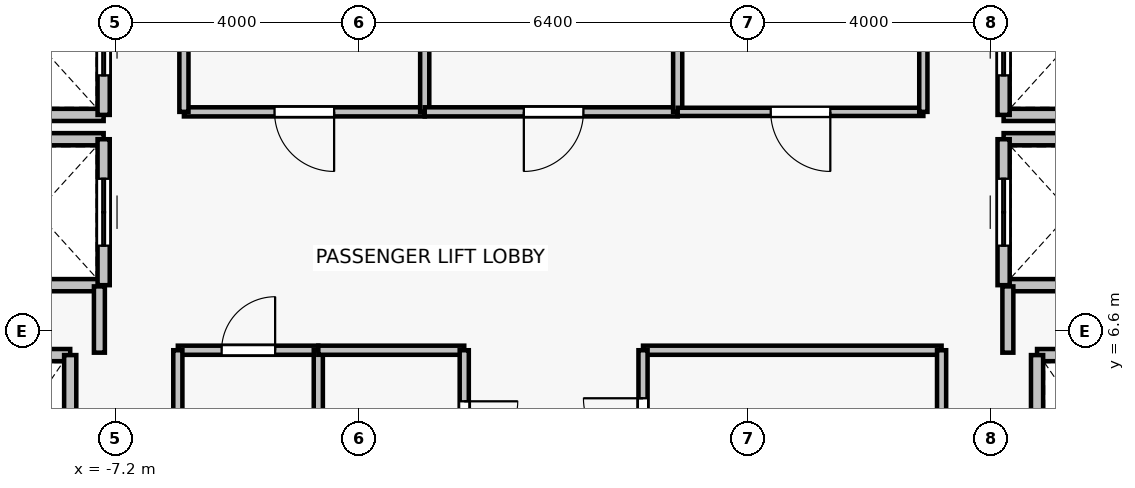
"""IFC4 building model, lengths in metres.
Left out: names, types, materials, properties, quantities, classifications, styles, units other than length and angle.
Written with IfcOpenShell. Run it as: python <this file> out.ifc"""

import sys

from ifc_helpers import new_model, si_unit, direction, frame, frame_2d, origin, place, context, subcontext, project, spatial, rectangle, extrude, source, transform, mapped, element, fill, save


model = new_model("IFC4")
c1 = context("Model", 3, precision=1e-05, world=origin(), true_north=direction((0.0, 1.0)))
c2 = subcontext(c1, "Body", "Model", "MODEL_VIEW")
j1 = project(units=[si_unit("LENGTHUNIT", "METRE"), si_unit("PLANEANGLEUNIT", "RADIAN")], contexts=[c1])
p1 = place(None, origin())
s1 = spatial("IfcSite", under=j1, at=p1, CompositionType="ELEMENT")
p2 = place(p1, origin())
s2 = spatial("IfcBuilding", under=s1, at=p2, CompositionType="ELEMENT")
p3 = place(p2, frame((0.0, 0.0, 245.2)))
s3 = spatial("IfcBuildingStorey", under=s2, at=p3, CompositionType="ELEMENT", Elevation=245.2)
p4 = place(p3, frame((-9.95, 6.2, 0.0), z_axis=(0.0, 0.0, 1.0), x_axis=(1.0, 0.0, 0.0)))
e1 = element("IfcWall", 1, at=p4, inside=s3, PredefinedType="SOLIDWALL", context=c2, shape_type="SweptSolid", body=[
    extrude(rectangle(XDim=2.0, YDim=0.2, at=frame_2d((1.0, 0.0))), origin(), (0.0, 0.0, 1.0), 3.075),
])
p5 = place(p3, frame((-7.95, 6.2, 0.0), z_axis=(0.0, 0.0, 1.0), x_axis=(0.0, -1.0, 0.0)))
e2 = element("IfcWall", 2, at=p5, inside=s3, PredefinedType="SOLIDWALL", context=c2, shape_type="SweptSolid", body=[
    extrude(rectangle(XDim=2.8, YDim=0.2, at=frame_2d((1.4, 0.0))), origin(), (0.0, 0.0, 1.0), 3.075),
])
p6 = place(p3, frame((7.95, 6.2, 0.0), z_axis=(0.0, 0.0, 1.0), x_axis=(1.0, 0.0, 0.0)))
e3 = element("IfcWall", 3, at=p6, inside=s3, PredefinedType="SOLIDWALL", context=c2, shape_type="SweptSolid", body=[
    extrude(rectangle(XDim=2.0, YDim=0.2, at=frame_2d((1.0, 0.0))), origin(), (0.0, 0.0, 1.0), 3.075),
])
p7 = place(p3, frame((7.95, 3.4, 0.0), z_axis=(0.0, 0.0, 1.0), x_axis=(0.0, 1.0, 0.0)))
e4 = element("IfcWall", 4, at=p7, inside=s3, PredefinedType="SOLIDWALL", context=c2, shape_type="SweptSolid", body=[
    extrude(rectangle(XDim=2.8, YDim=0.2, at=frame_2d((1.4, 0.0))), origin(), (0.0, 0.0, 1.0), 3.075),
])
for number, where, z_axis, x_axis in (
    (5, (-7.4, 7.35, 0.0), (0.0, 0.0, 1.0), (-1.0, 0.0, 0.0)),
    (6, (-9.6, 9.75, 0.0), (0.0, 0.0, 1.0), (1.0, 0.0, 0.0)),
):
    element("IfcWall", number, at=place(p3, frame(where, z_axis=z_axis, x_axis=x_axis)), inside=s3, PredefinedType="SOLIDWALL", context=c2, shape_type="SweptSolid", body=[
        extrude(rectangle(XDim=2.2, YDim=0.2, at=frame_2d((1.1, 0.0))), origin(), (0.0, 0.0, 1.0), 2.615),
    ])
p8 = place(p3, frame((-7.4, 9.75, 0.0), z_axis=(0.0, 0.0, 1.0), x_axis=(0.0, -1.0, 0.0)))
e7 = element("IfcWall", 7, at=p8, inside=s3, PredefinedType="SOLIDWALL", context=c2, shape_type="SweptSolid", body=[
    extrude(rectangle(XDim=2.4, YDim=0.2, at=frame_2d((1.2, 0.0))), origin(), (0.0, 0.0, 1.0), 2.615),
])
p9 = place(p8, frame((0.65, 0.0, 0.0)))
e8 = element("IfcOpeningElement", 8, at=p9, cuts=e7, PredefinedType="OPENING", context=c2, shape_type="SweptSolid", body=[
    extrude(rectangle(XDim=1.1, YDim=2.2, at=frame_2d((0.55, 1.1))), frame((0.0, 0.11, 0.0), z_axis=(0.0, -1.0, 0.0), x_axis=(1.0, 0.0, 0.0)), (0.0, 0.0, 1.0), 0.22),
])
p10 = place(p3, frame((-7.4, 10.15, 0.0), z_axis=(0.0, 0.0, 1.0), x_axis=(-1.0, 0.0, 0.0)))
e9 = element("IfcWall", 9, at=p10, inside=s3, PredefinedType="SOLIDWALL", context=c2, shape_type="SweptSolid", body=[
    extrude(rectangle(XDim=2.2, YDim=0.2, at=frame_2d((1.1, 0.0))), origin(), (0.0, 0.0, 1.0), 2.615),
])
p11 = place(p3, frame((-7.4, 12.55, 0.0), z_axis=(0.0, 0.0, 1.0), x_axis=(0.0, -1.0, 0.0)))
e10 = element("IfcWall", 10, at=p11, inside=s3, PredefinedType="SOLIDWALL", context=c2, shape_type="SweptSolid", body=[
    extrude(rectangle(XDim=2.4, YDim=0.2, at=frame_2d((1.2, 0.0))), origin(), (0.0, 0.0, 1.0), 2.615),
])
p12 = place(p11, frame((0.65, 0.0, 0.0)))
e11 = element("IfcOpeningElement", 11, at=p12, cuts=e10, PredefinedType="OPENING", context=c2, shape_type="SweptSolid", body=[
    extrude(rectangle(XDim=1.1, YDim=2.2, at=frame_2d((0.55, 1.1))), frame((0.0, 0.11, 0.0), z_axis=(0.0, -1.0, 0.0), x_axis=(1.0, 0.0, 0.0)), (0.0, 0.0, 1.0), 0.22),
])
for number, where, z_axis, x_axis in (
    (12, (9.6, 7.35, 0.0), (0.0, 0.0, 1.0), (-1.0, 0.0, 0.0)),
    (13, (7.4, 9.75, 0.0), (0.0, 0.0, 1.0), (1.0, 0.0, 0.0)),
):
    element("IfcWall", number, at=place(p3, frame(where, z_axis=z_axis, x_axis=x_axis)), inside=s3, PredefinedType="SOLIDWALL", context=c2, shape_type="SweptSolid", body=[
        extrude(rectangle(XDim=2.2, YDim=0.2, at=frame_2d((1.1, 0.0))), origin(), (0.0, 0.0, 1.0), 2.615),
    ])
p13 = place(p3, frame((7.4, 7.35, 0.0), z_axis=(0.0, 0.0, 1.0), x_axis=(0.0, 1.0, 0.0)))
e14 = element("IfcWall", 14, at=p13, inside=s3, PredefinedType="SOLIDWALL", context=c2, shape_type="SweptSolid", body=[
    extrude(rectangle(XDim=2.4, YDim=0.2, at=frame_2d((1.2, 0.0))), origin(), (0.0, 0.0, 1.0), 2.615),
])
p14 = place(p13, frame((0.65, 0.0, 0.0)))
e15 = element("IfcOpeningElement", 15, at=p14, cuts=e14, PredefinedType="OPENING", context=c2, shape_type="SweptSolid", body=[
    extrude(rectangle(XDim=1.1, YDim=2.2, at=frame_2d((0.55, 1.1))), frame((0.0, 0.11, 0.0), z_axis=(0.0, -1.0, 0.0), x_axis=(1.0, 0.0, 0.0)), (0.0, 0.0, 1.0), 0.22),
])
p15 = place(p3, frame((9.6, 10.15, 0.0), z_axis=(0.0, 0.0, 1.0), x_axis=(-1.0, 0.0, 0.0)))
e16 = element("IfcWall", 16, at=p15, inside=s3, PredefinedType="SOLIDWALL", context=c2, shape_type="SweptSolid", body=[
    extrude(rectangle(XDim=2.2, YDim=0.2, at=frame_2d((1.1, 0.0))), origin(), (0.0, 0.0, 1.0), 2.615),
])
p16 = place(p3, frame((7.4, 10.15, 0.0), z_axis=(0.0, 0.0, 1.0), x_axis=(0.0, 1.0, 0.0)))
e17 = element("IfcWall", 17, at=p16, inside=s3, PredefinedType="SOLIDWALL", context=c2, shape_type="SweptSolid", body=[
    extrude(rectangle(XDim=2.4, YDim=0.2, at=frame_2d((1.2, 0.0))), origin(), (0.0, 0.0, 1.0), 2.615),
])
p17 = place(p16, frame((0.65, 0.0, 0.0)))
e18 = element("IfcOpeningElement", 18, at=p17, cuts=e17, PredefinedType="OPENING", context=c2, shape_type="SweptSolid", body=[
    extrude(rectangle(XDim=1.1, YDim=2.2, at=frame_2d((0.55, 1.1))), frame((0.0, 0.11, 0.0), z_axis=(0.0, -1.0, 0.0), x_axis=(1.0, 0.0, 0.0)), (0.0, 0.0, 1.0), 0.22),
])
for number, where, z_axis, x_axis in (
    (19, (-7.47, 7.33, 0.0), (0.0, 0.0, 1.0), (0.0, -1.0, 0.0)),
    (20, (7.47, 6.24, 0.0), (0.0, 0.0, 1.0), (0.0, 1.0, 0.0)),
):
    element("IfcWall", number, at=place(p3, frame(where, z_axis=z_axis, x_axis=x_axis)), inside=s3, PredefinedType="PARTITIONING", context=c2, shape_type="SweptSolid", body=[
        extrude(rectangle(XDim=1.09, YDim=0.18, at=frame_2d((0.545, 0.0))), origin(), (0.0, 0.0, 1.0), 2.615),
    ])
p18 = place(p3, frame((-2.12, 10.2, 0.0), z_axis=(0.0, 0.0, 1.0), x_axis=(-1.0, 0.0, 0.0)))
e21 = element("IfcWall", 21, at=p18, inside=s3, PredefinedType="PARTITIONING", context=c2, shape_type="SweptSolid", body=[
    extrude(rectangle(XDim=3.96, YDim=0.15, at=frame_2d((1.98, 0.0))), origin(), (0.0, 0.0, 1.0), 3.075),
])
p19 = place(p18, frame((1.49, 0.0, 0.0)))
e22 = element("IfcOpeningElement", 22, at=p19, cuts=e21, PredefinedType="OPENING", context=c2, shape_type="SweptSolid", body=[
    extrude(rectangle(XDim=0.98, YDim=2.15, at=frame_2d((0.49, 1.075))), frame((0.0, 0.085, 0.0), z_axis=(0.0, -1.0, 0.0), x_axis=(1.0, 0.0, 0.0)), (0.0, 0.0, 1.0), 0.17),
])
for number, where, z_axis, x_axis in (
    (23, (-6.08, 10.2, 0.0), (0.0, 0.0, 1.0), (0.0, 1.0, 0.0)),
    (24, (-2.12, 13.0, 0.0), (0.0, 0.0, 1.0), (0.0, -1.0, 0.0)),
):
    element("IfcWall", number, at=place(p3, frame(where, z_axis=z_axis, x_axis=x_axis)), inside=s3, PredefinedType="PARTITIONING", context=c2, shape_type="SweptSolid", body=[
        extrude(rectangle(XDim=2.8, YDim=0.15, at=frame_2d((1.4, 0.0))), origin(), (0.0, 0.0, 1.0), 3.075),
    ])
p20 = place(p3, frame((2.04, 10.2, 0.0), z_axis=(0.0, 0.0, 1.0), x_axis=(-1.0, 0.0, 0.0)))
e25 = element("IfcWall", 25, at=p20, inside=s3, PredefinedType="PARTITIONING", context=c2, shape_type="SweptSolid", body=[
    extrude(rectangle(XDim=4.16, YDim=0.15, at=frame_2d((2.08, 0.0))), origin(), (0.0, 0.0, 1.0), 3.075),
])
p21 = place(p20, frame((1.55, 0.0, 0.0)))
e26 = element("IfcOpeningElement", 26, at=p21, cuts=e25, PredefinedType="OPENING", context=c2, shape_type="SweptSolid", body=[
    extrude(rectangle(XDim=0.98, YDim=2.15, at=frame_2d((0.49, 1.075))), frame((0.0, 0.085, 0.0), z_axis=(0.0, -1.0, 0.0), x_axis=(1.0, 0.0, 0.0)), (0.0, 0.0, 1.0), 0.17),
])
p22 = place(p3, frame((2.04, 13.0, 0.0), z_axis=(0.0, 0.0, 1.0), x_axis=(0.0, -1.0, 0.0)))
e27 = element("IfcWall", 27, at=p22, inside=s3, PredefinedType="PARTITIONING", context=c2, shape_type="SweptSolid", body=[
    extrude(rectangle(XDim=2.8, YDim=0.15, at=frame_2d((1.4, 0.0))), origin(), (0.0, 0.0, 1.0), 3.075),
])
p23 = place(p3, frame((6.08, 10.2, 0.0), z_axis=(0.0, 0.0, 1.0), x_axis=(-1.0, 0.0, 0.0)))
e28 = element("IfcWall", 28, at=p23, inside=s3, PredefinedType="PARTITIONING", context=c2, shape_type="SweptSolid", body=[
    extrude(rectangle(XDim=4.04, YDim=0.135, at=frame_2d((2.02, 0.0))), origin(), (0.0, 0.0, 1.0), 3.075),
])
p24 = place(p23, frame((1.53, 0.0, 0.0)))
e29 = element("IfcOpeningElement", 29, at=p24, cuts=e28, PredefinedType="OPENING", context=c2, shape_type="SweptSolid", body=[
    extrude(rectangle(XDim=0.98, YDim=2.15, at=frame_2d((0.49, 1.075))), frame((0.0, 0.077, 0.0), z_axis=(0.0, -1.0, 0.0), x_axis=(1.0, 0.0, 0.0)), (0.0, 0.0, 1.0), 0.155),
])
p25 = place(p3, frame((6.08, 13.0, 0.0), z_axis=(0.0, 0.0, 1.0), x_axis=(0.0, -1.0, 0.0)))
e30 = element("IfcWall", 30, at=p25, inside=s3, PredefinedType="PARTITIONING", context=c2, shape_type="SweptSolid", body=[
    extrude(rectangle(XDim=2.8, YDim=0.135, at=frame_2d((1.4, 0.0))), origin(), (0.0, 0.0, 1.0), 3.075),
])
p26 = place(p3, frame((-6.18, 6.28, 0.0), z_axis=(0.0, 0.0, 1.0), x_axis=(1.0, 0.0, 0.0)))
e31 = element("IfcWall", 31, at=p26, inside=s3, PredefinedType="PARTITIONING", context=c2, shape_type="SweptSolid", body=[
    extrude(rectangle(XDim=2.31, YDim=0.15, at=frame_2d((1.155, 0.0))), origin(), (0.0, 0.0, 1.0), 3.075),
])
p27 = place(p26, frame((0.72, 0.0, 0.0)))
e32 = element("IfcOpeningElement", 32, at=p27, cuts=e31, PredefinedType="OPENING", context=c2, shape_type="SweptSolid", body=[
    extrude(rectangle(XDim=0.88, YDim=2.1, at=frame_2d((0.44, 1.05))), frame((0.0, 0.085, 0.0), z_axis=(0.0, -1.0, 0.0), x_axis=(1.0, 0.0, 0.0)), (0.0, 0.0, 1.0), 0.17),
])
for number, where, z_axis, x_axis in (
    (33, (-6.18, 3.76, 0.0), (0.0, 0.0, 1.0), (0.0, 1.0, 0.0)),
    (34, (-3.87, 6.28, 0.0), (0.0, 0.0, 1.0), (0.0, -1.0, 0.0)),
):
    element("IfcWall", number, at=place(p3, frame(where, z_axis=z_axis, x_axis=x_axis)), inside=s3, PredefinedType="PARTITIONING", context=c2, shape_type="SweptSolid", body=[
        extrude(rectangle(XDim=2.52, YDim=0.15, at=frame_2d((1.26, 0.0))), origin(), (0.0, 0.0, 1.0), 3.075),
    ])
p28 = place(p3, frame((-3.87, 6.28, 0.0), z_axis=(0.0, 0.0, 1.0), x_axis=(1.0, 0.0, 0.0)))
e35 = element("IfcWall", 35, at=p28, inside=s3, PredefinedType="PARTITIONING", context=c2, shape_type="SweptSolid", body=[
    extrude(rectangle(XDim=2.4, YDim=0.15, at=frame_2d((1.2, 0.0))), origin(), (0.0, 0.0, 1.0), 3.075),
])
p29 = place(p3, frame((-1.47, 6.28, 0.0), z_axis=(0.0, 0.0, 1.0), x_axis=(0.0, -1.0, 0.0)))
e36 = element("IfcWall", 36, at=p29, inside=s3, PredefinedType="PARTITIONING", context=c2, shape_type="SweptSolid", body=[
    extrude(rectangle(XDim=2.52, YDim=0.15, at=frame_2d((1.26, 0.0))), origin(), (0.0, 0.0, 1.0), 3.075),
])
p30 = place(p29, frame((0.84, 0.0, 0.0)))
e37 = element("IfcOpeningElement", 37, at=p30, cuts=e36, PredefinedType="OPENING", context=c2, shape_type="SweptSolid", body=[
    extrude(rectangle(XDim=0.88, YDim=2.1, at=frame_2d((0.44, 1.05))), frame((0.0, 0.085, 0.0), z_axis=(0.0, -1.0, 0.0), x_axis=(1.0, 0.0, 0.0)), (0.0, 0.0, 1.0), 0.17),
])
p31 = place(p3, frame((1.47, 6.28, 0.0), z_axis=(0.0, 0.0, 1.0), x_axis=(1.0, 0.0, 0.0)))
e38 = element("IfcWall", 38, at=p31, inside=s3, PredefinedType="PARTITIONING", context=c2, shape_type="SweptSolid", body=[
    extrude(rectangle(XDim=4.91, YDim=0.15, at=frame_2d((2.455, 0.0))), origin(), (0.0, 0.0, 1.0), 3.075),
])
p32 = place(p3, frame((1.47, 3.76, 0.0), z_axis=(0.0, 0.0, 1.0), x_axis=(0.0, 1.0, 0.0)))
e39 = element("IfcWall", 39, at=p32, inside=s3, PredefinedType="PARTITIONING", context=c2, shape_type="SweptSolid", body=[
    extrude(rectangle(XDim=2.52, YDim=0.15, at=frame_2d((1.26, 0.0))), origin(), (0.0, 0.0, 1.0), 3.075),
])
p33 = place(p32, frame((0.75, 0.0, 0.0)))
e40 = element("IfcOpeningElement", 40, at=p33, cuts=e39, PredefinedType="OPENING", context=c2, shape_type="SweptSolid", body=[
    extrude(rectangle(XDim=0.98, YDim=2.15, at=frame_2d((0.49, 1.075))), frame((0.0, 0.085, 0.0), z_axis=(0.0, -1.0, 0.0), x_axis=(1.0, 0.0, 0.0)), (0.0, 0.0, 1.0), 0.17),
])
p34 = place(p3, frame((6.38, 6.28, 0.0), z_axis=(0.0, 0.0, 1.0), x_axis=(0.0, -1.0, 0.0)))
e41 = element("IfcWall", 41, at=p34, inside=s3, PredefinedType="PARTITIONING", context=c2, shape_type="SweptSolid", body=[
    extrude(rectangle(XDim=2.52, YDim=0.15, at=frame_2d((1.26, 0.0))), origin(), (0.0, 0.0, 1.0), 3.075),
])
m1 = source(origin(), c2, "Body", "SweptSolid", [
    extrude(rectangle(XDim=1.1, YDim=2.2, at=frame_2d((0.55, 1.1))), frame((0.0, 0.025, 0.0), z_axis=(0.0, -1.0, 0.0), x_axis=(1.0, 0.0, 0.0)), (0.0, 0.0, 1.0), 0.05),
])
p35 = place(p9, origin())
e42 = element("IfcDoor", 42, at=p35, inside=s3, OperationType="DOUBLE_DOOR_SLIDING", PredefinedType="DOOR", context=c2, shape_type="MappedRepresentation", body=[
    mapped(m1, transform((0.0, 0.0, 0.0), x_axis=(1.0, 0.0, 0.0), y_axis=(0.0, 1.0, 0.0), z_axis=(0.0, 0.0, 1.0), scale=1.0)),
])
fill(e8, e42)
p36 = place(p12, origin())
e43 = element("IfcDoor", 43, at=p36, inside=s3, OperationType="DOUBLE_DOOR_SLIDING", PredefinedType="DOOR", context=c2, shape_type="MappedRepresentation", body=[
    mapped(m1, transform((0.0, 0.0, 0.0), x_axis=(1.0, 0.0, 0.0), y_axis=(0.0, 1.0, 0.0), z_axis=(0.0, 0.0, 1.0), scale=1.0)),
])
fill(e11, e43)
p37 = place(p14, origin())
e44 = element("IfcDoor", 44, at=p37, inside=s3, OperationType="DOUBLE_DOOR_SLIDING", PredefinedType="DOOR", context=c2, shape_type="MappedRepresentation", body=[
    mapped(m1, transform((0.0, 0.0, 0.0), x_axis=(1.0, 0.0, 0.0), y_axis=(0.0, 1.0, 0.0), z_axis=(0.0, 0.0, 1.0), scale=1.0)),
])
fill(e15, e44)
p38 = place(p17, origin())
e45 = element("IfcDoor", 45, at=p38, inside=s3, OperationType="DOUBLE_DOOR_SLIDING", PredefinedType="DOOR", context=c2, shape_type="MappedRepresentation", body=[
    mapped(m1, transform((0.0, 0.0, 0.0), x_axis=(1.0, 0.0, 0.0), y_axis=(0.0, 1.0, 0.0), z_axis=(0.0, 0.0, 1.0), scale=1.0)),
])
fill(e18, e45)
m2 = source(origin(), c2, "Body", "SweptSolid", [
    extrude(rectangle(XDim=0.98, YDim=2.15, at=frame_2d((0.49, 1.075))), frame((0.0, 0.025, 0.0), z_axis=(0.0, -1.0, 0.0), x_axis=(1.0, 0.0, 0.0)), (0.0, 0.0, 1.0), 0.05),
])
p39 = place(p19, origin())
e46 = element("IfcDoor", 46, at=p39, inside=s3, OperationType="SINGLE_SWING_LEFT", PredefinedType="DOOR", context=c2, shape_type="MappedRepresentation", body=[
    mapped(m2, transform((0.0, 0.0, 0.0), x_axis=(1.0, 0.0, 0.0), y_axis=(0.0, 1.0, 0.0), z_axis=(0.0, 0.0, 1.0), scale=1.0)),
])
fill(e22, e46)
p40 = place(p21, origin())
e47 = element("IfcDoor", 47, at=p40, inside=s3, OperationType="SINGLE_SWING_RIGHT", PredefinedType="DOOR", context=c2, shape_type="MappedRepresentation", body=[
    mapped(m2, transform((0.0, 0.0, 0.0), x_axis=(1.0, 0.0, 0.0), y_axis=(0.0, 1.0, 0.0), z_axis=(0.0, 0.0, 1.0), scale=1.0)),
])
fill(e26, e47)
p41 = place(p24, origin())
e48 = element("IfcDoor", 48, at=p41, inside=s3, OperationType="SINGLE_SWING_LEFT", PredefinedType="DOOR", context=c2, shape_type="MappedRepresentation", body=[
    mapped(m2, transform((0.0, 0.0, 0.0), x_axis=(1.0, 0.0, 0.0), y_axis=(0.0, 1.0, 0.0), z_axis=(0.0, 0.0, 1.0), scale=1.0)),
])
fill(e29, e48)
m3 = source(origin(), c2, "Body", "SweptSolid", [
    extrude(rectangle(XDim=0.88, YDim=2.1, at=frame_2d((0.44, 1.05))), frame((0.0, 0.025, 0.0), z_axis=(0.0, -1.0, 0.0), x_axis=(1.0, 0.0, 0.0)), (0.0, 0.0, 1.0), 0.05),
])
p42 = place(p27, origin())
e49 = element("IfcDoor", 49, at=p42, inside=s3, OperationType="SINGLE_SWING_RIGHT", PredefinedType="DOOR", context=c2, shape_type="MappedRepresentation", body=[
    mapped(m3, transform((0.0, 0.0, 0.0), x_axis=(1.0, 0.0, 0.0), y_axis=(0.0, 1.0, 0.0), z_axis=(0.0, 0.0, 1.0), scale=1.0)),
])
fill(e32, e49)
p43 = place(p30, origin())
e50 = element("IfcDoor", 50, at=p43, inside=s3, OperationType="SINGLE_SWING_LEFT", PredefinedType="DOOR", context=c2, shape_type="MappedRepresentation", body=[
    mapped(m3, transform((0.0, 0.0, 0.0), x_axis=(1.0, 0.0, 0.0), y_axis=(0.0, 1.0, 0.0), z_axis=(0.0, 0.0, 1.0), scale=1.0)),
])
fill(e37, e50)
p44 = place(p33, origin())
e51 = element("IfcDoor", 51, at=p44, inside=s3, OperationType="SINGLE_SWING_RIGHT", PredefinedType="DOOR", context=c2, shape_type="MappedRepresentation", body=[
    mapped(m2, transform((0.0, 0.0, 0.0), x_axis=(1.0, 0.0, 0.0), y_axis=(0.0, 1.0, 0.0), z_axis=(0.0, 0.0, 1.0), scale=1.0)),
])
fill(e40, e51)
save(model, sys.argv[1])
